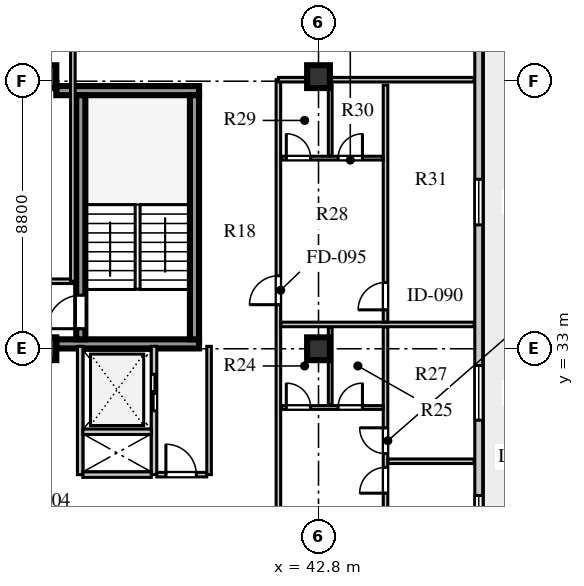
"""IFC4 building model, lengths in metres.
Left out: names, types, materials, properties, quantities, classifications, styles, units other than length and angle.
Written with IfcOpenShell. Run it as: python <this file> out.ifc"""

import sys

from ifc_helpers import new_model, si_unit, direction, frame, frame_2d, origin, origin_2d, place, context, subcontext, project, spatial, rectangle, extrude, element, fill, save


model = new_model("IFC4")
c1 = context("Model", 3, precision=1e-05, world=origin(), true_north=direction((0.0, 1.0)))
c2 = subcontext(c1, "Body", "Model", "MODEL_VIEW")
j1 = project(units=[si_unit("LENGTHUNIT", "METRE"), si_unit("PLANEANGLEUNIT", "RADIAN")], contexts=[c1])
p1 = place(None, origin())
s1 = spatial("IfcSite", under=j1, at=p1, CompositionType="ELEMENT")
p2 = place(p1, origin())
s2 = spatial("IfcBuilding", under=s1, at=p2, CompositionType="ELEMENT")
p3 = place(p2, frame((0.0, 0.0, 312.5)))
s3 = spatial("IfcBuildingStorey", under=s2, at=p3, CompositionType="ELEMENT", Elevation=312.5)
for number, where, z_axis, x_axis in (
    (1, (34.175, 33.16, 0.0), (0.0, 0.0, 1.0), (1.0, 0.0, 0.0)),
    (2, (34.175, 41.49, 0.0), (0.0, 0.0, 1.0), (1.0, 0.0, 0.0)),
):
    element("IfcWall", number, at=place(p3, frame(where, z_axis=z_axis, x_axis=x_axis)), inside=s3, PredefinedType="SHEAR", context=c2, shape_type="SweptSolid", body=[
        extrude(rectangle(XDim=4.695, YDim=0.3, at=frame_2d((2.348, 0.0))), origin(), (0.0, 0.0, 1.0), 3.56),
    ])
p4 = place(p3, frame((34.98, 33.31, 0.0), z_axis=(0.0, 0.0, 1.0), x_axis=(0.0, 1.0, 0.0)))
e3 = element("IfcWall", 3, at=p4, inside=s3, PredefinedType="SHEAR", context=c2, shape_type="SweptSolid", body=[
    extrude(rectangle(XDim=8.03, YDim=0.3, at=frame_2d((4.015, 0.0))), origin(), (0.0, 0.0, 1.0), 3.56),
])
p5 = place(p4, frame((0.35, 0.0, 0.0)))
e4 = element("IfcOpeningElement", 4, at=p5, cuts=e3, PredefinedType="OPENING", context=c2, shape_type="SweptSolid", body=[
    extrude(rectangle(XDim=1.1, YDim=2.1, at=frame_2d((0.55, 1.05))), frame((0.0, 0.16, 0.0), z_axis=(0.0, -1.0, 0.0), x_axis=(1.0, 0.0, 0.0)), (0.0, 0.0, 1.0), 0.32),
])
p6 = place(p3, frame((38.72, 33.31, 0.0), z_axis=(0.0, 0.0, 1.0), x_axis=(0.0, 1.0, 0.0)))
e5 = element("IfcWall", 5, at=p6, inside=s3, PredefinedType="SHEAR", context=c2, shape_type="SweptSolid", body=[
    extrude(rectangle(XDim=8.03, YDim=0.3, at=frame_2d((4.015, 0.0))), origin(), (0.0, 0.0, 1.0), 3.56),
])
for number, where, z_axis, x_axis in (
    (6, (33.8, 33.0, 0.0), (0.0, 0.0, 1.0), (1.0, 0.0, 0.0)),
    (7, (33.8, 41.95, 0.0), (0.0, 0.0, 1.0), (1.0, 0.0, 0.0)),
    (8, (42.8, 33.0, 0.0), (0.0, 0.0, 1.0), (1.0, 0.0, 0.0)),
    (9, (42.8, 41.95, 0.0), (0.0, 0.0, 1.0), (1.0, 0.0, 0.0)),
):
    element("IfcColumn", number, at=place(p3, frame(where, z_axis=z_axis, x_axis=x_axis)), inside=s3, PredefinedType="COLUMN", context=c2, shape_type="SweptSolid", body=[
        extrude(rectangle(XDim=0.75, YDim=0.75, at=origin_2d()), origin(), (0.0, 0.0, 1.0), 3.56),
    ])
p7 = place(p3, frame((48.07, 13.41, 0.0), z_axis=(0.0, 0.0, 1.0), x_axis=(0.0, 1.0, 0.0)))
e10 = element("IfcWall", 10, at=p7, inside=s3, PredefinedType="SOLIDWALL", context=c2, shape_type="SweptSolid", body=[
    extrude(rectangle(XDim=30.38, YDim=0.26, at=frame_2d((15.19, 0.0))), origin(), (0.0, 0.0, 1.0), 3.56),
])
p8 = place(p7, frame((2.43, 0.0, 0.0)))
e11 = element("IfcOpeningElement", 11, at=p8, cuts=e10, PredefinedType="OPENING", context=c2, shape_type="SweptSolid", body=[
    extrude(rectangle(XDim=1.0, YDim=2.05, at=frame_2d((0.5, 1.025))), frame((0.0, 0.14, 0.0), z_axis=(0.0, -1.0, 0.0), x_axis=(1.0, 0.0, 0.0)), (0.0, 0.0, 1.0), 0.28),
])
p9 = place(p7, frame((6.465, 0.0, 0.8)))
e12 = element("IfcOpeningElement", 12, at=p9, cuts=e10, PredefinedType="OPENING", context=c2, shape_type="SweptSolid", body=[
    extrude(rectangle(XDim=1.95, YDim=2.0, at=frame_2d((0.975, 1.0))), frame((0.0, 0.14, 0.0), z_axis=(0.0, -1.0, 0.0), x_axis=(1.0, 0.0, 0.0)), (0.0, 0.0, 1.0), 0.28),
])
p10 = place(p7, frame((12.515, 0.0, 0.8)))
e13 = element("IfcOpeningElement", 13, at=p10, cuts=e10, PredefinedType="OPENING", context=c2, shape_type="SweptSolid", body=[
    extrude(rectangle(XDim=2.25, YDim=2.0, at=frame_2d((1.125, 1.0))), frame((0.0, 0.14, 0.0), z_axis=(0.0, -1.0, 0.0), x_axis=(1.0, 0.0, 0.0)), (0.0, 0.0, 1.0), 0.28),
])
p11 = place(p7, frame((17.24, 0.0, 0.8)))
e14 = element("IfcOpeningElement", 14, at=p11, cuts=e10, PredefinedType="OPENING", context=c2, shape_type="SweptSolid", body=[
    extrude(rectangle(XDim=1.8, YDim=2.0, at=frame_2d((0.9, 1.0))), frame((0.0, 0.14, 0.0), z_axis=(0.0, -1.0, 0.0), x_axis=(1.0, 0.0, 0.0)), (0.0, 0.0, 1.0), 0.28),
])
p12 = place(p7, frame((23.665, 0.0, 0.8)))
e15 = element("IfcOpeningElement", 15, at=p12, cuts=e10, PredefinedType="OPENING", context=c2, shape_type="SweptSolid", body=[
    extrude(rectangle(XDim=1.5, YDim=2.0, at=frame_2d((0.75, 1.0))), frame((0.0, 0.14, 0.0), z_axis=(0.0, -1.0, 0.0), x_axis=(1.0, 0.0, 0.0)), (0.0, 0.0, 1.0), 0.28),
])
p13 = place(p3, frame((34.96, 28.86, 0.0), z_axis=(0.0, 0.0, 1.0), x_axis=(0.0, 1.0, 0.0)))
e16 = element("IfcWall", 16, at=p13, inside=s3, PredefinedType="SOLIDWALL", context=c2, shape_type="SweptSolid", body=[
    extrude(rectangle(XDim=4.22, YDim=0.18, at=frame_2d((2.11, 0.0))), origin(), (0.0, 0.0, 1.0), 3.56),
])
p14 = place(p3, frame((37.39, 28.86, 0.0), z_axis=(0.0, 0.0, 1.0), x_axis=(0.0, 1.0, 0.0)))
e17 = element("IfcWall", 17, at=p14, inside=s3, PredefinedType="SOLIDWALL", context=c2, shape_type="SweptSolid", body=[
    extrude(rectangle(XDim=4.22, YDim=0.18, at=frame_2d((2.11, 0.0))), origin(), (0.0, 0.0, 1.0), 3.56),
])
p15 = place(p14, frame((2.1, 0.0, 0.0)))
e18 = element("IfcOpeningElement", 18, at=p15, cuts=e17, PredefinedType="OPENING", context=c2, shape_type="SweptSolid", body=[
    extrude(rectangle(XDim=1.2, YDim=2.12, at=frame_2d((0.6, 1.06))), frame((0.0, 0.1, 0.0), z_axis=(0.0, -1.0, 0.0), x_axis=(1.0, 0.0, 0.0)), (0.0, 0.0, 1.0), 0.2),
])
for number, where, z_axis, x_axis in (
    (19, (35.05, 28.86, 0.0), (0.0, 0.0, 1.0), (1.0, 0.0, 0.0)),
    (20, (35.05, 30.27, 0.0), (0.0, 0.0, 1.0), (1.0, 0.0, 0.0)),
):
    element("IfcWall", number, at=place(p3, frame(where, z_axis=z_axis, x_axis=x_axis)), inside=s3, PredefinedType="SOLIDWALL", context=c2, shape_type="SweptSolid", body=[
        extrude(rectangle(XDim=2.25, YDim=0.18, at=frame_2d((1.125, 0.0))), origin(), (0.0, 0.0, 1.0), 3.56),
    ])
p16 = place(p3, frame((39.2, 28.86, 0.0), z_axis=(0.0, 0.0, 1.0), x_axis=(0.0, 1.0, 0.0)))
e21 = element("IfcWall", 21, at=p16, inside=s3, PredefinedType="PARTITIONING", context=c2, shape_type="SweptSolid", body=[
    extrude(rectangle(XDim=4.22, YDim=0.15, at=frame_2d((2.11, 0.0))), origin(), (0.0, 0.0, 1.0), 3.56),
])
p17 = place(p3, frame((37.48, 28.86, 0.0), z_axis=(0.0, 0.0, 1.0), x_axis=(1.0, 0.0, 0.0)))
e22 = element("IfcWall", 22, at=p17, inside=s3, PredefinedType="PARTITIONING", context=c2, shape_type="SweptSolid", body=[
    extrude(rectangle(XDim=1.64, YDim=0.15, at=frame_2d((0.82, 0.0))), origin(), (0.0, 0.0, 1.0), 3.56),
])
p18 = place(p17, frame((0.3, 0.0, 0.0)))
e23 = element("IfcOpeningElement", 23, at=p18, cuts=e22, PredefinedType="OPENING", context=c2, shape_type="SweptSolid", body=[
    extrude(rectangle(XDim=1.0, YDim=2.1, at=frame_2d((0.5, 1.05))), frame((0.0, 0.085, 0.0), z_axis=(0.0, -1.0, 0.0), x_axis=(1.0, 0.0, 0.0)), (0.0, 0.0, 1.0), 0.17),
])
p19 = place(p3, frame((25.22, 35.22, 0.0), z_axis=(0.0, 0.0, 1.0), x_axis=(1.0, 0.0, 0.0)))
e24 = element("IfcWall", 24, at=p19, inside=s3, PredefinedType="PARTITIONING", context=c2, shape_type="SweptSolid", body=[
    extrude(rectangle(XDim=9.5, YDim=0.15, at=frame_2d((4.75, 0.0))), origin(), (0.0, 0.0, 1.0), 3.56),
])
p20 = place(p19, frame((1.8, 0.0, 0.0)))
e25 = element("IfcOpeningElement", 25, at=p20, cuts=e24, PredefinedType="OPENING", context=c2, shape_type="SweptSolid", body=[
    extrude(rectangle(XDim=1.1, YDim=2.08, at=frame_2d((0.55, 1.04))), frame((0.0, 0.085, 0.0), z_axis=(0.0, -1.0, 0.0), x_axis=(1.0, 0.0, 0.0)), (0.0, 0.0, 1.0), 0.17),
])
p21 = place(p3, frame((34.72, 35.22, 0.0), z_axis=(0.0, 0.0, 1.0), x_axis=(0.0, 1.0, 0.0)))
e26 = element("IfcWall", 26, at=p21, inside=s3, PredefinedType="PARTITIONING", context=c2, shape_type="SweptSolid", body=[
    extrude(rectangle(XDim=11.6, YDim=0.15, at=frame_2d((5.8, 0.0))), origin(), (0.0, 0.0, 1.0), 3.56),
])
p22 = place(p3, frame((41.48, 15.35, 0.0), z_axis=(0.0, 0.0, 1.0), x_axis=(0.0, 1.0, 0.0)))
e27 = element("IfcWall", 27, at=p22, inside=s3, PredefinedType="PARTITIONING", context=c2, shape_type="SweptSolid", body=[
    extrude(rectangle(XDim=26.5, YDim=0.15, at=frame_2d((13.25, 0.0))), origin(), (0.0, 0.0, 1.0), 3.56),
])
p23 = place(p22, frame((0.75, 0.0, 0.0)))
e28 = element("IfcOpeningElement", 28, at=p23, cuts=e27, PredefinedType="OPENING", context=c2, shape_type="SweptSolid", body=[
    extrude(rectangle(XDim=0.95, YDim=2.1, at=frame_2d((0.475, 1.05))), frame((0.0, 0.085, 0.0), z_axis=(0.0, -1.0, 0.0), x_axis=(1.0, 0.0, 0.0)), (0.0, 0.0, 1.0), 0.17),
])
p24 = place(p22, frame((10.1, 0.0, 0.0)))
e29 = element("IfcOpeningElement", 29, at=p24, cuts=e27, PredefinedType="OPENING", context=c2, shape_type="SweptSolid", body=[
    extrude(rectangle(XDim=0.95, YDim=2.1, at=frame_2d((0.475, 1.05))), frame((0.0, 0.085, 0.0), z_axis=(0.0, -1.0, 0.0), x_axis=(1.0, 0.0, 0.0)), (0.0, 0.0, 1.0), 0.17),
])
p25 = place(p22, frame((19.1, 0.0, 0.0)))
e30 = element("IfcOpeningElement", 30, at=p25, cuts=e27, PredefinedType="OPENING", context=c2, shape_type="SweptSolid", body=[
    extrude(rectangle(XDim=0.95, YDim=2.1, at=frame_2d((0.475, 1.05))), frame((0.0, 0.085, 0.0), z_axis=(0.0, -1.0, 0.0), x_axis=(1.0, 0.0, 0.0)), (0.0, 0.0, 1.0), 0.17),
])
p26 = place(p3, frame((41.48, 41.85, 0.0), z_axis=(0.0, 0.0, 1.0), x_axis=(1.0, 0.0, 0.0)))
e31 = element("IfcWall", 31, at=p26, inside=s3, PredefinedType="PARTITIONING", context=c2, shape_type="SweptSolid", body=[
    extrude(rectangle(XDim=6.44, YDim=0.15, at=frame_2d((3.22, 0.0))), origin(), (0.0, 0.0, 1.0), 2.96),
])
p27 = place(p3, frame((45.004, 24.88, 0.0), z_axis=(0.0, 0.0, 1.0), x_axis=(0.0, 1.0, 0.0)))
e32 = element("IfcWall", 32, at=p27, inside=s3, PredefinedType="PARTITIONING", context=c2, shape_type="SweptSolid", body=[
    extrude(rectangle(XDim=8.84, YDim=0.15, at=frame_2d((4.42, 0.0))), origin(), (0.0, 0.0, 1.0), 3.56),
])
p28 = place(p27, frame((3.37, 0.0, 0.0)))
e33 = element("IfcOpeningElement", 33, at=p28, cuts=e32, PredefinedType="OPENING", context=c2, shape_type="SweptSolid", body=[
    extrude(rectangle(XDim=0.85, YDim=2.08, at=frame_2d((0.425, 1.04))), frame((0.0, 0.085, 0.0), z_axis=(0.0, -1.0, 0.0), x_axis=(1.0, 0.0, 0.0)), (0.0, 0.0, 1.0), 0.17),
])
p29 = place(p27, frame((4.67, 0.0, 0.0)))
e34 = element("IfcOpeningElement", 34, at=p29, cuts=e32, PredefinedType="OPENING", context=c2, shape_type="SweptSolid", body=[
    extrude(rectangle(XDim=0.85, YDim=2.08, at=frame_2d((0.425, 1.04))), frame((0.0, 0.085, 0.0), z_axis=(0.0, -1.0, 0.0), x_axis=(1.0, 0.0, 0.0)), (0.0, 0.0, 1.0), 0.17),
])
p30 = place(p3, frame((41.58, 31.068, 0.0), z_axis=(0.0, 0.0, 1.0), x_axis=(1.0, 0.0, 0.0)))
e35 = element("IfcWall", 35, at=p30, inside=s3, PredefinedType="PLUMBINGWALL", context=c2, shape_type="SweptSolid", body=[
    extrude(rectangle(XDim=3.344, YDim=0.125, at=frame_2d((1.672, 0.0))), origin(), (0.0, 0.0, 1.0), 3.56),
])
p31 = place(p30, frame((0.16, 0.0, 0.0)))
e36 = element("IfcOpeningElement", 36, at=p31, cuts=e35, PredefinedType="OPENING", context=c2, shape_type="SweptSolid", body=[
    extrude(rectangle(XDim=0.8, YDim=2.05, at=frame_2d((0.4, 1.025))), frame((0.0, 0.073, 0.0), z_axis=(0.0, -1.0, 0.0), x_axis=(1.0, 0.0, 0.0)), (0.0, 0.0, 1.0), 0.145),
])
p32 = place(p30, frame((1.865, 0.0, 0.0)))
e37 = element("IfcOpeningElement", 37, at=p32, cuts=e35, PredefinedType="OPENING", context=c2, shape_type="SweptSolid", body=[
    extrude(rectangle(XDim=0.8, YDim=2.05, at=frame_2d((0.4, 1.025))), frame((0.0, 0.073, 0.0), z_axis=(0.0, -1.0, 0.0), x_axis=(1.0, 0.0, 0.0)), (0.0, 0.0, 1.0), 0.145),
])
p33 = place(p3, frame((43.185, 31.148, 0.0), z_axis=(0.0, 0.0, 1.0), x_axis=(0.0, 1.0, 0.0)))
e38 = element("IfcWall", 38, at=p33, inside=s3, PredefinedType="PLUMBINGWALL", context=c2, shape_type="SweptSolid", body=[
    extrude(rectangle(XDim=2.572, YDim=0.125, at=frame_2d((1.286, 0.0))), origin(), (0.0, 0.0, 1.0), 3.56),
])
p34 = place(p3, frame((45.084, 29.3, 0.0), z_axis=(0.0, 0.0, 1.0), x_axis=(1.0, 0.0, 0.0)))
e39 = element("IfcWall", 39, at=p34, inside=s3, PredefinedType="PARTITIONING", context=c2, shape_type="SweptSolid", body=[
    extrude(rectangle(XDim=2.836, YDim=0.15, at=frame_2d((1.418, 0.0))), origin(), (0.0, 0.0, 1.0), 3.56),
])
p35 = place(p3, frame((41.56, 33.8, 0.0), z_axis=(0.0, 0.0, 1.0), x_axis=(1.0, 0.0, 0.0)))
e40 = element("IfcWall", 40, at=p35, inside=s3, PredefinedType="PARTITIONING", context=c2, shape_type="SweptSolid", body=[
    extrude(rectangle(XDim=6.36, YDim=0.15, at=frame_2d((3.18, 0.0))), origin(), (0.0, 0.0, 1.0), 3.56),
])
p36 = place(p3, frame((45.004, 33.88, 0.0), z_axis=(0.0, 0.0, 1.0), x_axis=(0.0, 1.0, 0.0)))
e41 = element("IfcWall", 41, at=p36, inside=s3, PredefinedType="PARTITIONING", context=c2, shape_type="SweptSolid", body=[
    extrude(rectangle(XDim=7.79, YDim=0.15, at=frame_2d((3.895, 0.0))), origin(), (0.0, 0.0, 1.0), 3.56),
])
p37 = place(p36, frame((0.4, 0.0, 0.0)))
e42 = element("IfcOpeningElement", 42, at=p37, cuts=e41, PredefinedType="OPENING", context=c2, shape_type="SweptSolid", body=[
    extrude(rectangle(XDim=0.9, YDim=2.08, at=frame_2d((0.45, 1.04))), frame((0.0, 0.085, 0.0), z_axis=(0.0, -1.0, 0.0), x_axis=(1.0, 0.0, 0.0)), (0.0, 0.0, 1.0), 0.17),
])
p38 = place(p3, frame((41.58, 39.27, 0.0), z_axis=(0.0, 0.0, 1.0), x_axis=(1.0, 0.0, 0.0)))
e43 = element("IfcWall", 43, at=p38, inside=s3, PredefinedType="PLUMBINGWALL", context=c2, shape_type="SweptSolid", body=[
    extrude(rectangle(XDim=3.344, YDim=0.125, at=frame_2d((1.672, 0.0))), origin(), (0.0, 0.0, 1.0), 3.56),
])
p39 = place(p38, frame((0.16, 0.0, 0.0)))
e44 = element("IfcOpeningElement", 44, at=p39, cuts=e43, PredefinedType="OPENING", context=c2, shape_type="SweptSolid", body=[
    extrude(rectangle(XDim=0.8, YDim=2.05, at=frame_2d((0.4, 1.025))), frame((0.0, 0.073, 0.0), z_axis=(0.0, -1.0, 0.0), x_axis=(1.0, 0.0, 0.0)), (0.0, 0.0, 1.0), 0.145),
])
p40 = place(p38, frame((1.865, 0.0, 0.0)))
e45 = element("IfcOpeningElement", 45, at=p40, cuts=e43, PredefinedType="OPENING", context=c2, shape_type="SweptSolid", body=[
    extrude(rectangle(XDim=0.8, YDim=2.05, at=frame_2d((0.4, 1.025))), frame((0.0, 0.073, 0.0), z_axis=(0.0, -1.0, 0.0), x_axis=(1.0, 0.0, 0.0)), (0.0, 0.0, 1.0), 0.145),
])
p41 = place(p3, frame((43.185, 39.35, 0.0), z_axis=(0.0, 0.0, 1.0), x_axis=(0.0, 1.0, 0.0)))
e46 = element("IfcWall", 46, at=p41, inside=s3, PredefinedType="PLUMBINGWALL", context=c2, shape_type="SweptSolid", body=[
    extrude(rectangle(XDim=2.32, YDim=0.125, at=frame_2d((1.16, 0.0))), origin(), (0.0, 0.0, 1.0), 3.56),
])
p42 = place(p10, origin())
e47 = element("IfcWindow", 47, at=p42, inside=s3, PartitioningType="SINGLE_PANEL", PredefinedType="WINDOW", context=c2, shape_type="SweptSolid", body=[
    extrude(rectangle(XDim=2.25, YDim=2.0, at=frame_2d((1.125, 1.0))), frame((0.0, 0.03, 0.0), z_axis=(0.0, -1.0, 0.0), x_axis=(1.0, 0.0, 0.0)), (0.0, 0.0, 1.0), 0.06),
])
fill(e13, e47)
p43 = place(p11, origin())
e48 = element("IfcWindow", 48, at=p43, inside=s3, PartitioningType="SINGLE_PANEL", PredefinedType="WINDOW", context=c2, shape_type="SweptSolid", body=[
    extrude(rectangle(XDim=1.8, YDim=2.0, at=frame_2d((0.9, 1.0))), frame((0.0, 0.03, 0.0), z_axis=(0.0, -1.0, 0.0), x_axis=(1.0, 0.0, 0.0)), (0.0, 0.0, 1.0), 0.06),
])
fill(e14, e48)
p44 = place(p12, origin())
e49 = element("IfcWindow", 49, at=p44, inside=s3, PartitioningType="SINGLE_PANEL", PredefinedType="WINDOW", context=c2, shape_type="SweptSolid", body=[
    extrude(rectangle(XDim=1.5, YDim=2.0, at=frame_2d((0.75, 1.0))), frame((0.0, 0.03, 0.0), z_axis=(0.0, -1.0, 0.0), x_axis=(1.0, 0.0, 0.0)), (0.0, 0.0, 1.0), 0.06),
])
fill(e15, e49)
p45 = place(p5, origin())
e50 = element("IfcDoor", 50, at=p45, inside=s3, OperationType="SINGLE_SWING_LEFT", PredefinedType="DOOR", context=c2, shape_type="SweptSolid", body=[
    extrude(rectangle(XDim=1.1, YDim=2.1, at=frame_2d((0.55, 1.05))), frame((0.0, 0.025, 0.0), z_axis=(0.0, -1.0, 0.0), x_axis=(1.0, 0.0, 0.0)), (0.0, 0.0, 1.0), 0.05),
])
fill(e4, e50)
p46 = place(p15, frame((1.2, 0.0, 0.0), z_axis=(0.0, 0.0, 1.0), x_axis=(-1.0, 0.0, 0.0)))
e51 = element("IfcDoor", 51, at=p46, inside=s3, OperationType="DOUBLE_DOOR_SLIDING", PredefinedType="DOOR", context=c2, shape_type="SweptSolid", body=[
    extrude(rectangle(XDim=1.2, YDim=2.12, at=frame_2d((0.6, 1.06))), frame((0.0, 0.025, 0.0), z_axis=(0.0, -1.0, 0.0), x_axis=(1.0, 0.0, 0.0)), (0.0, 0.0, 1.0), 0.05),
])
fill(e18, e51)
p47 = place(p18, origin())
e52 = element("IfcDoor", 52, at=p47, inside=s3, OperationType="SINGLE_SWING_LEFT", PredefinedType="DOOR", context=c2, shape_type="SweptSolid", body=[
    extrude(rectangle(XDim=1.0, YDim=2.1, at=frame_2d((0.5, 1.05))), frame((0.0, 0.025, 0.0), z_axis=(0.0, -1.0, 0.0), x_axis=(1.0, 0.0, 0.0)), (0.0, 0.0, 1.0), 0.05),
])
fill(e23, e52)
p48 = place(p31, origin())
e53 = element("IfcDoor", 53, at=p48, inside=s3, OperationType="SINGLE_SWING_LEFT", PredefinedType="DOOR", context=c2, shape_type="SweptSolid", body=[
    extrude(rectangle(XDim=0.8, YDim=2.05, at=frame_2d((0.4, 1.025))), frame((0.0, 0.025, 0.0), z_axis=(0.0, -1.0, 0.0), x_axis=(1.0, 0.0, 0.0)), (0.0, 0.0, 1.0), 0.05),
])
fill(e36, e53)
p49 = place(p32, origin())
e54 = element("IfcDoor", 54, at=p49, inside=s3, OperationType="SINGLE_SWING_RIGHT", PredefinedType="DOOR", context=c2, shape_type="SweptSolid", body=[
    extrude(rectangle(XDim=0.8, YDim=2.05, at=frame_2d((0.4, 1.025))), frame((0.0, 0.025, 0.0), z_axis=(0.0, -1.0, 0.0), x_axis=(1.0, 0.0, 0.0)), (0.0, 0.0, 1.0), 0.05),
])
fill(e37, e54)
p50 = place(p28, origin())
e55 = element("IfcDoor", 55, at=p50, inside=s3, OperationType="SINGLE_SWING_LEFT", PredefinedType="DOOR", context=c2, shape_type="SweptSolid", body=[
    extrude(rectangle(XDim=0.85, YDim=2.08, at=frame_2d((0.425, 1.04))), frame((0.0, 0.025, 0.0), z_axis=(0.0, -1.0, 0.0), x_axis=(1.0, 0.0, 0.0)), (0.0, 0.0, 1.0), 0.05),
])
fill(e33, e55)
p51 = place(p29, origin())
e56 = element("IfcDoor", 56, at=p51, inside=s3, OperationType="SINGLE_SWING_RIGHT", PredefinedType="DOOR", context=c2, shape_type="SweptSolid", body=[
    extrude(rectangle(XDim=0.85, YDim=2.08, at=frame_2d((0.425, 1.04))), frame((0.0, 0.025, 0.0), z_axis=(0.0, -1.0, 0.0), x_axis=(1.0, 0.0, 0.0)), (0.0, 0.0, 1.0), 0.05),
])
fill(e34, e56)
p52 = place(p39, origin())
e57 = element("IfcDoor", 57, at=p52, inside=s3, OperationType="SINGLE_SWING_LEFT", PredefinedType="DOOR", context=c2, shape_type="SweptSolid", body=[
    extrude(rectangle(XDim=0.8, YDim=2.05, at=frame_2d((0.4, 1.025))), frame((0.0, 0.025, 0.0), z_axis=(0.0, -1.0, 0.0), x_axis=(1.0, 0.0, 0.0)), (0.0, 0.0, 1.0), 0.05),
])
fill(e44, e57)
p53 = place(p40, origin())
e58 = element("IfcDoor", 58, at=p53, inside=s3, OperationType="SINGLE_SWING_RIGHT", PredefinedType="DOOR", context=c2, shape_type="SweptSolid", body=[
    extrude(rectangle(XDim=0.8, YDim=2.05, at=frame_2d((0.4, 1.025))), frame((0.0, 0.025, 0.0), z_axis=(0.0, -1.0, 0.0), x_axis=(1.0, 0.0, 0.0)), (0.0, 0.0, 1.0), 0.05),
])
fill(e45, e58)
p54 = place(p37, origin())
e59 = element("IfcDoor", 59, at=p54, inside=s3, OperationType="SINGLE_SWING_LEFT", PredefinedType="DOOR", context=c2, shape_type="SweptSolid", body=[
    extrude(rectangle(XDim=0.9, YDim=2.08, at=frame_2d((0.45, 1.04))), frame((0.0, 0.025, 0.0), z_axis=(0.0, -1.0, 0.0), x_axis=(1.0, 0.0, 0.0)), (0.0, 0.0, 1.0), 0.05),
])
fill(e42, e59)
p55 = place(p25, origin())
e60 = element("IfcDoor", 60, at=p55, inside=s3, OperationType="SINGLE_SWING_LEFT", PredefinedType="DOOR", context=c2, shape_type="SweptSolid", body=[
    extrude(rectangle(XDim=0.95, YDim=2.1, at=frame_2d((0.475, 1.05))), frame((0.0, 0.025, 0.0), z_axis=(0.0, -1.0, 0.0), x_axis=(1.0, 0.0, 0.0)), (0.0, 0.0, 1.0), 0.05),
])
fill(e30, e60)
save(model, sys.argv[1])
